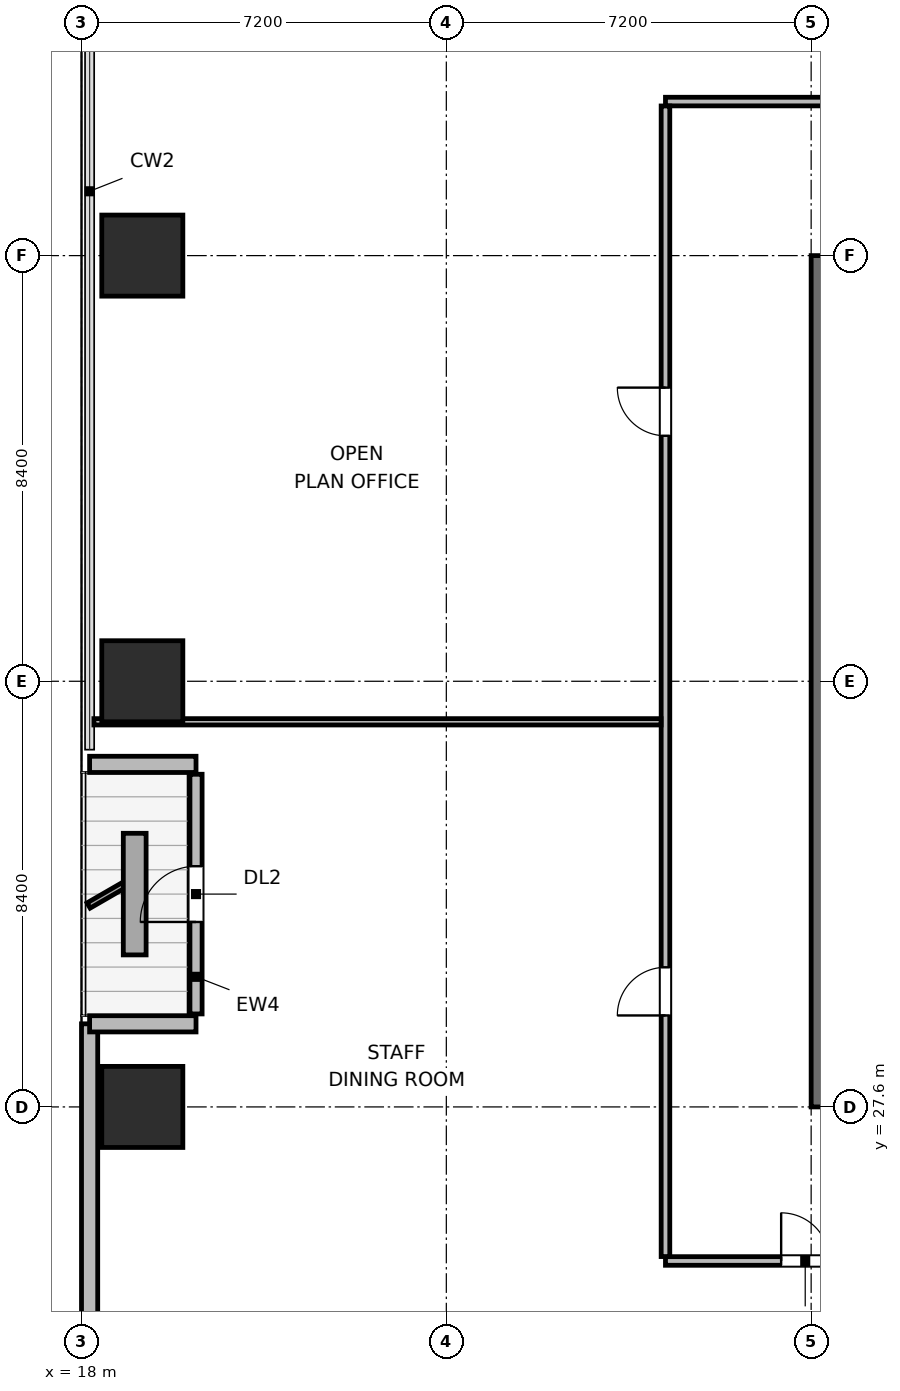
"""IFC4 building model, lengths in metres.
Left out: names, types, materials, properties, quantities, classifications, styles, units other than length and angle.
Written with IfcOpenShell. Run it as: python <this file> out.ifc"""

import sys

from ifc_helpers import new_model, si_unit, direction, frame, frame_2d, origin, origin_2d, place, context, subcontext, project, spatial, rectangle, extrude, element, fill, save


model = new_model("IFC4")
c1 = context("Model", 3, precision=1e-05, world=origin(), true_north=direction((0.0, 1.0)))
c2 = subcontext(c1, "Body", "Model", "MODEL_VIEW")
j1 = project(units=[si_unit("LENGTHUNIT", "METRE"), si_unit("PLANEANGLEUNIT", "RADIAN")], contexts=[c1])
p1 = place(None, origin())
s1 = spatial("IfcSite", under=j1, at=p1, CompositionType="ELEMENT")
p2 = place(p1, origin())
s2 = spatial("IfcBuilding", under=s1, at=p2, CompositionType="ELEMENT")
p3 = place(p2, frame((0.0, 0.0, 56.7)))
s3 = spatial("IfcBuildingStorey", under=s2, at=p3, CompositionType="ELEMENT", Elevation=56.7)
p4 = place(p3, frame((32.875, 27.6, 0.0), z_axis=(0.0, 0.0, 1.0), x_axis=(0.0, 1.0, 0.0)))
e1 = element("IfcWall", 1, at=p4, inside=s3, PredefinedType="SHEAR", context=c2, shape_type="SweptSolid", body=[
    extrude(rectangle(XDim=16.8, YDim=0.95, at=frame_2d((8.4, 0.0))), origin(), (0.0, 0.0, 1.0), 3.9),
])
for number, where, z_axis, x_axis in (
    (2, (19.2, 27.6, 0.0), (0.0, 0.0, 1.0), (1.0, 0.0, 0.0)),
    (3, (19.2, 36.0, 0.0), (0.0, 0.0, 1.0), (1.0, 0.0, 0.0)),
    (4, (19.2, 44.4, 0.0), (0.0, 0.0, 1.0), (1.0, 0.0, 0.0)),
):
    element("IfcColumn", number, at=place(p3, frame(where, z_axis=z_axis, x_axis=x_axis)), inside=s3, PredefinedType="COLUMN", context=c2, shape_type="SweptSolid", body=[
        extrude(rectangle(XDim=1.6, YDim=1.6, at=origin_2d()), origin(), (0.0, 0.0, 1.0), 3.9),
    ])
p5 = place(p3, frame((18.16, 15.021, 0.0), z_axis=(0.0, 0.0, 1.0), x_axis=(0.0, 1.0, 0.0)))
e5 = element("IfcWall", 5, at=p5, inside=s3, PredefinedType="SOLIDWALL", context=c2, shape_type="SweptSolid", body=[
    extrude(rectangle(XDim=14.219, YDim=0.32, at=frame_2d((7.109, 0.0))), origin(), (0.0, 0.0, 1.0), 3.64),
])
p6 = place(p3, frame((18.16, 29.24, 0.0), z_axis=(0.0, 0.0, 1.0), x_axis=(1.0, 0.0, 0.0)))
e6 = element("IfcWall", 6, at=p6, inside=s3, PredefinedType="SOLIDWALL", context=c2, shape_type="SweptSolid", body=[
    extrude(rectangle(XDim=2.1, YDim=0.32, at=frame_2d((1.05, 0.0))), origin(), (0.0, 0.0, 1.0), 2.875),
])
p7 = place(p3, frame((20.26, 29.435, 0.0), z_axis=(0.0, 0.0, 1.0), x_axis=(0.0, 1.0, 0.0)))
e7 = element("IfcWall", 7, at=p7, inside=s3, PredefinedType="SOLIDWALL", context=c2, shape_type="SweptSolid", body=[
    extrude(rectangle(XDim=4.73, YDim=0.24, at=frame_2d((2.365, 0.0))), origin(), (0.0, 0.0, 1.0), 3.162),
])
p8 = place(p7, frame((1.815, 0.0, 0.0)))
e8 = element("IfcOpeningElement", 8, at=p8, cuts=e7, PredefinedType="OPENING", context=c2, shape_type="SweptSolid", body=[
    extrude(rectangle(XDim=1.1, YDim=2.04, at=frame_2d((0.55, 1.02))), frame((0.0, 0.13, 0.0), z_axis=(0.0, -1.0, 0.0), x_axis=(1.0, 0.0, 0.0)), (0.0, 0.0, 1.0), 0.26),
])
p9 = place(p3, frame((20.26, 34.36, 0.0), z_axis=(0.0, 0.0, 1.0), x_axis=(-1.0, 0.0, 0.0)))
e9 = element("IfcWall", 9, at=p9, inside=s3, PredefinedType="SOLIDWALL", context=c2, shape_type="SweptSolid", body=[
    extrude(rectangle(XDim=2.1, YDim=0.32, at=frame_2d((1.05, 0.0))), origin(), (0.0, 0.0, 1.0), 2.875),
])
p10 = place(p3, frame((29.525, 24.56, 0.0), z_axis=(0.0, 0.0, 1.0), x_axis=(1.0, 0.0, 0.0)))
e10 = element("IfcWall", 10, at=p10, inside=s3, PredefinedType="PARTITIONING", context=c2, shape_type="SweptSolid", body=[
    extrude(rectangle(XDim=36.95, YDim=0.17, at=frame_2d((18.475, 0.0))), origin(), (0.0, 0.0, 1.0), 3.64),
])
p11 = place(p10, frame((2.283, 0.0, 0.0)))
e11 = element("IfcOpeningElement", 11, at=p11, cuts=e10, PredefinedType="OPENING", context=c2, shape_type="SweptSolid", body=[
    extrude(rectangle(XDim=0.95, YDim=2.04, at=frame_2d((0.475, 1.02))), frame((0.0, 0.095, 0.0), z_axis=(0.0, -1.0, 0.0), x_axis=(1.0, 0.0, 0.0)), (0.0, 0.0, 1.0), 0.19),
])
p12 = place(p10, frame((7.2, 0.0, 0.0)))
e12 = element("IfcOpeningElement", 12, at=p12, cuts=e10, PredefinedType="OPENING", context=c2, shape_type="SweptSolid", body=[
    extrude(rectangle(XDim=0.95, YDim=2.04, at=frame_2d((0.475, 1.02))), frame((0.0, 0.095, 0.0), z_axis=(0.0, -1.0, 0.0), x_axis=(1.0, 0.0, 0.0)), (0.0, 0.0, 1.0), 0.19),
])
p13 = place(p10, frame((11.52, 0.0, 0.0)))
e13 = element("IfcOpeningElement", 13, at=p13, cuts=e10, PredefinedType="OPENING", context=c2, shape_type="SweptSolid", body=[
    extrude(rectangle(XDim=0.95, YDim=2.04, at=frame_2d((0.475, 1.02))), frame((0.0, 0.095, 0.0), z_axis=(0.0, -1.0, 0.0), x_axis=(1.0, 0.0, 0.0)), (0.0, 0.0, 1.0), 0.19),
])
p14 = place(p10, frame((15.84, 0.0, 0.0)))
e14 = element("IfcOpeningElement", 14, at=p14, cuts=e10, PredefinedType="OPENING", context=c2, shape_type="SweptSolid", body=[
    extrude(rectangle(XDim=0.95, YDim=2.04, at=frame_2d((0.475, 1.02))), frame((0.0, 0.095, 0.0), z_axis=(0.0, -1.0, 0.0), x_axis=(1.0, 0.0, 0.0)), (0.0, 0.0, 1.0), 0.19),
])
p15 = place(p10, frame((20.16, 0.0, 0.0)))
e15 = element("IfcOpeningElement", 15, at=p15, cuts=e10, PredefinedType="OPENING", context=c2, shape_type="SweptSolid", body=[
    extrude(rectangle(XDim=0.95, YDim=2.04, at=frame_2d((0.475, 1.02))), frame((0.0, 0.095, 0.0), z_axis=(0.0, -1.0, 0.0), x_axis=(1.0, 0.0, 0.0)), (0.0, 0.0, 1.0), 0.19),
])
p16 = place(p10, frame((24.48, 0.0, 0.0)))
e16 = element("IfcOpeningElement", 16, at=p16, cuts=e10, PredefinedType="OPENING", context=c2, shape_type="SweptSolid", body=[
    extrude(rectangle(XDim=0.95, YDim=2.04, at=frame_2d((0.475, 1.02))), frame((0.0, 0.095, 0.0), z_axis=(0.0, -1.0, 0.0), x_axis=(1.0, 0.0, 0.0)), (0.0, 0.0, 1.0), 0.19),
])
p17 = place(p10, frame((28.8, 0.0, 0.0)))
e17 = element("IfcOpeningElement", 17, at=p17, cuts=e10, PredefinedType="OPENING", context=c2, shape_type="SweptSolid", body=[
    extrude(rectangle(XDim=0.95, YDim=2.04, at=frame_2d((0.475, 1.02))), frame((0.0, 0.095, 0.0), z_axis=(0.0, -1.0, 0.0), x_axis=(1.0, 0.0, 0.0)), (0.0, 0.0, 1.0), 0.19),
])
p18 = place(p10, frame((33.718, 0.0, 0.0)))
e18 = element("IfcOpeningElement", 18, at=p18, cuts=e10, PredefinedType="OPENING", context=c2, shape_type="SweptSolid", body=[
    extrude(rectangle(XDim=0.95, YDim=2.04, at=frame_2d((0.475, 1.02))), frame((0.0, 0.095, 0.0), z_axis=(0.0, -1.0, 0.0), x_axis=(1.0, 0.0, 0.0)), (0.0, 0.0, 1.0), 0.19),
])
p19 = place(p3, frame((29.525, 47.44, 0.0), z_axis=(0.0, 0.0, 1.0), x_axis=(1.0, 0.0, 0.0)))
e19 = element("IfcWall", 19, at=p19, inside=s3, PredefinedType="PARTITIONING", context=c2, shape_type="SweptSolid", body=[
    extrude(rectangle(XDim=36.95, YDim=0.17, at=frame_2d((18.475, 0.0))), origin(), (0.0, 0.0, 1.0), 3.64),
])
p20 = place(p19, frame((4.133, 0.0, 0.0)))
e20 = element("IfcOpeningElement", 20, at=p20, cuts=e19, PredefinedType="OPENING", context=c2, shape_type="SweptSolid", body=[
    extrude(rectangle(XDim=0.95, YDim=2.04, at=frame_2d((0.475, 1.02))), frame((0.0, 0.095, 0.0), z_axis=(0.0, -1.0, 0.0), x_axis=(1.0, 0.0, 0.0)), (0.0, 0.0, 1.0), 0.19),
])
p21 = place(p19, frame((13.645, 0.0, 0.0)))
e21 = element("IfcOpeningElement", 21, at=p21, cuts=e19, PredefinedType="OPENING", context=c2, shape_type="SweptSolid", body=[
    extrude(rectangle(XDim=0.95, YDim=2.04, at=frame_2d((0.475, 1.02))), frame((0.0, 0.095, 0.0), z_axis=(0.0, -1.0, 0.0), x_axis=(1.0, 0.0, 0.0)), (0.0, 0.0, 1.0), 0.19),
])
p22 = place(p19, frame((20.555, 0.0, 0.0)))
e22 = element("IfcOpeningElement", 22, at=p22, cuts=e19, PredefinedType="OPENING", context=c2, shape_type="SweptSolid", body=[
    extrude(rectangle(XDim=0.95, YDim=2.04, at=frame_2d((0.475, 1.02))), frame((0.0, 0.095, 0.0), z_axis=(0.0, -1.0, 0.0), x_axis=(1.0, 0.0, 0.0)), (0.0, 0.0, 1.0), 0.19),
])
p23 = place(p19, frame((29.517, 0.0, 0.0)))
e23 = element("IfcOpeningElement", 23, at=p23, cuts=e19, PredefinedType="OPENING", context=c2, shape_type="SweptSolid", body=[
    extrude(rectangle(XDim=0.95, YDim=2.04, at=frame_2d((0.475, 1.02))), frame((0.0, 0.095, 0.0), z_axis=(0.0, -1.0, 0.0), x_axis=(1.0, 0.0, 0.0)), (0.0, 0.0, 1.0), 0.19),
])
p24 = place(p3, frame((29.525, 24.647, 0.0), z_axis=(0.0, 0.0, 1.0), x_axis=(0.0, 1.0, 0.0)))
e24 = element("IfcWall", 24, at=p24, inside=s3, PredefinedType="PARTITIONING", context=c2, shape_type="SweptSolid", body=[
    extrude(rectangle(XDim=22.706, YDim=0.17, at=frame_2d((11.353, 0.0))), origin(), (0.0, 0.0, 1.0), 3.64),
])
p25 = place(p24, frame((4.758, 0.0, 0.0)))
e25 = element("IfcOpeningElement", 25, at=p25, cuts=e24, PredefinedType="OPENING", context=c2, shape_type="SweptSolid", body=[
    extrude(rectangle(XDim=0.95, YDim=2.04, at=frame_2d((0.475, 1.02))), frame((0.0, 0.095, 0.0), z_axis=(0.0, -1.0, 0.0), x_axis=(1.0, 0.0, 0.0)), (0.0, 0.0, 1.0), 0.19),
])
p26 = place(p24, frame((16.198, 0.0, 0.0)))
e26 = element("IfcOpeningElement", 26, at=p26, cuts=e24, PredefinedType="OPENING", context=c2, shape_type="SweptSolid", body=[
    extrude(rectangle(XDim=0.95, YDim=2.04, at=frame_2d((0.475, 1.02))), frame((0.0, 0.095, 0.0), z_axis=(0.0, -1.0, 0.0), x_axis=(1.0, 0.0, 0.0)), (0.0, 0.0, 1.0), 0.19),
])
p27 = place(p3, frame((18.245, 35.2, 0.0), z_axis=(0.0, 0.0, 1.0), x_axis=(1.0, 0.0, 0.0)))
e27 = element("IfcWall", 27, at=p27, inside=s3, PredefinedType="PARTITIONING", context=c2, shape_type="SweptSolid", body=[
    extrude(rectangle(XDim=11.193, YDim=0.125, at=frame_2d((5.596, 0.0))), origin(), (0.0, 0.0, 1.0), 3.64),
])
p28 = place(p8, origin())
e28 = element("IfcDoor", 28, at=p28, inside=s3, OperationType="SINGLE_SWING_LEFT", PredefinedType="DOOR", context=c2, shape_type="SweptSolid", body=[
    extrude(rectangle(XDim=1.1, YDim=2.04, at=frame_2d((0.55, 1.02))), frame((0.0, 0.025, 0.0), z_axis=(0.0, -1.0, 0.0), x_axis=(1.0, 0.0, 0.0)), (0.0, 0.0, 1.0), 0.05),
])
fill(e8, e28)
p29 = place(p11, origin())
e29 = element("IfcDoor", 29, at=p29, inside=s3, OperationType="SINGLE_SWING_LEFT", PredefinedType="DOOR", context=c2, shape_type="SweptSolid", body=[
    extrude(rectangle(XDim=0.95, YDim=2.04, at=frame_2d((0.475, 1.02))), frame((0.0, 0.025, 0.0), z_axis=(0.0, -1.0, 0.0), x_axis=(1.0, 0.0, 0.0)), (0.0, 0.0, 1.0), 0.05),
])
fill(e11, e29)
p30 = place(p25, origin())
e30 = element("IfcDoor", 30, at=p30, inside=s3, OperationType="SINGLE_SWING_LEFT", PredefinedType="DOOR", context=c2, shape_type="SweptSolid", body=[
    extrude(rectangle(XDim=0.95, YDim=2.04, at=frame_2d((0.475, 1.02))), frame((0.0, 0.025, 0.0), z_axis=(0.0, -1.0, 0.0), x_axis=(1.0, 0.0, 0.0)), (0.0, 0.0, 1.0), 0.05),
])
fill(e25, e30)
p31 = place(p26, origin())
e31 = element("IfcDoor", 31, at=p31, inside=s3, OperationType="SINGLE_SWING_RIGHT", PredefinedType="DOOR", context=c2, shape_type="SweptSolid", body=[
    extrude(rectangle(XDim=0.95, YDim=2.04, at=frame_2d((0.475, 1.02))), frame((0.0, 0.025, 0.0), z_axis=(0.0, -1.0, 0.0), x_axis=(1.0, 0.0, 0.0)), (0.0, 0.0, 1.0), 0.05),
])
fill(e26, e31)
save(model, sys.argv[1])
